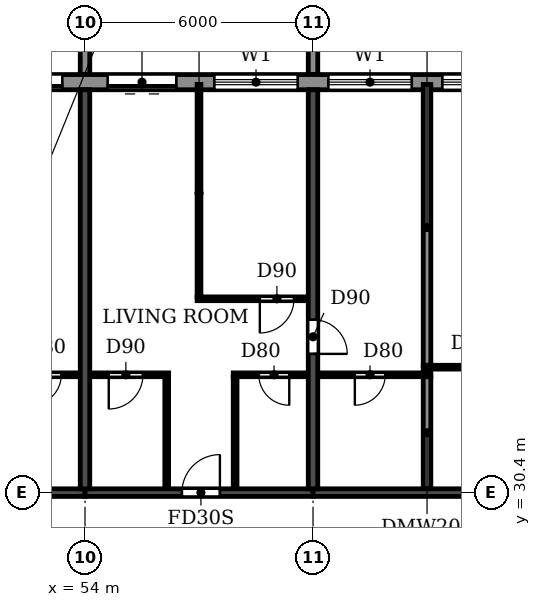
"""IFC4 building model, lengths in metres.
Left out: names, types, materials, properties, quantities, classifications, styles, units other than length and angle.
Written with IfcOpenShell. Run it as: python <this file> out.ifc"""

import sys

from ifc_helpers import new_model, si_unit, direction, frame, frame_2d, origin, place, context, subcontext, project, spatial, polyline, rectangle, outline, extrude, source, transform, mapped, element, fill, save


model = new_model("IFC4")
c1 = context("Model", 3, precision=1e-05, world=origin(), true_north=direction((0.0, 1.0)))
c2 = subcontext(c1, "Body", "Model", "MODEL_VIEW")
j1 = project(units=[si_unit("LENGTHUNIT", "METRE"), si_unit("PLANEANGLEUNIT", "RADIAN")], contexts=[c1])
p1 = place(None, origin())
s1 = spatial("IfcSite", under=j1, at=p1, CompositionType="ELEMENT")
p2 = place(p1, origin())
s2 = spatial("IfcBuilding", under=s1, at=p2, CompositionType="ELEMENT")
p3 = place(p2, frame((0.0, 0.0, 251.1)))
s3 = spatial("IfcBuildingStorey", under=s2, at=p3, CompositionType="ELEMENT", Elevation=251.1)
p4 = place(p3, frame((54.0, 30.5, 0.0), z_axis=(0.0, 0.0, 1.0), x_axis=(0.0, 1.0, 0.0)))
e1 = element("IfcWall", 1, at=p4, inside=s3, PredefinedType="SHEAR", context=c2, shape_type="SweptSolid", body=[
    extrude(rectangle(XDim=10.5, YDim=0.25, at=frame_2d((5.25, 0.0))), origin(), (0.0, 0.0, 1.0), 3.08),
])
p5 = place(p3, frame((60.0, 30.5, 0.0), z_axis=(0.0, 0.0, 1.0), x_axis=(0.0, 1.0, 0.0)))
e2 = element("IfcWall", 2, at=p5, inside=s3, PredefinedType="SHEAR", context=c2, shape_type="SweptSolid", body=[
    extrude(rectangle(XDim=10.5, YDim=0.25, at=frame_2d((5.25, 0.0))), origin(), (0.0, 0.0, 1.0), 3.08),
])
p6 = place(p5, frame((3.55, 0.0, 0.0)))
e3 = element("IfcOpeningElement", 3, at=p6, cuts=e2, PredefinedType="OPENING", context=c2, shape_type="SweptSolid", body=[
    extrude(rectangle(XDim=0.9, YDim=2.1, at=frame_2d((0.45, 1.05))), frame((0.0, 0.135, 0.0), z_axis=(0.0, -1.0, 0.0), x_axis=(1.0, 0.0, 0.0)), (0.0, 0.0, 1.0), 0.27),
])
p7 = place(p3, frame((48.0, 30.4, 0.0), z_axis=(0.0, 0.0, 1.0), x_axis=(1.0, 0.0, 0.0)))
e4 = element("IfcWall", 4, at=p7, inside=s3, PredefinedType="SHEAR", context=c2, shape_type="SweptSolid", body=[
    extrude(rectangle(XDim=6.0, YDim=0.2, at=frame_2d((3.0, 0.0))), origin(), (0.0, 0.0, 1.0), 2.48),
])
p8 = place(p7, frame((2.55, 0.0, 0.0)))
e5 = element("IfcOpeningElement", 5, at=p8, cuts=e4, PredefinedType="OPENING", context=c2, shape_type="SweptSolid", body=[
    extrude(rectangle(XDim=1.0, YDim=2.1, at=frame_2d((0.5, 1.05))), frame((0.0, 0.11, 0.0), z_axis=(0.0, -1.0, 0.0), x_axis=(1.0, 0.0, 0.0)), (0.0, 0.0, 1.0), 0.22),
])
p9 = place(p3, frame((54.0, 30.4, 0.0), z_axis=(0.0, 0.0, 1.0), x_axis=(1.0, 0.0, 0.0)))
e6 = element("IfcWall", 6, at=p9, inside=s3, PredefinedType="SHEAR", context=c2, shape_type="SweptSolid", body=[
    extrude(rectangle(XDim=6.0, YDim=0.2, at=frame_2d((3.0, 0.0))), origin(), (0.0, 0.0, 1.0), 2.48),
])
p10 = place(p9, frame((2.55, 0.0, 0.0)))
e7 = element("IfcOpeningElement", 7, at=p10, cuts=e6, PredefinedType="OPENING", context=c2, shape_type="SweptSolid", body=[
    extrude(rectangle(XDim=1.0, YDim=2.1, at=frame_2d((0.5, 1.05))), frame((0.0, 0.11, 0.0), z_axis=(0.0, -1.0, 0.0), x_axis=(1.0, 0.0, 0.0)), (0.0, 0.0, 1.0), 0.22),
])
p11 = place(p3, frame((60.0, 30.4, 0.0), z_axis=(0.0, 0.0, 1.0), x_axis=(1.0, 0.0, 0.0)))
e8 = element("IfcWall", 8, at=p11, inside=s3, PredefinedType="SHEAR", context=c2, shape_type="SweptSolid", body=[
    extrude(rectangle(XDim=6.0, YDim=0.2, at=frame_2d((3.0, 0.0))), origin(), (0.0, 0.0, 1.0), 2.48),
])
p12 = place(p3, frame((79.317, 41.2, 0.0), z_axis=(0.0, 0.0, 1.0), x_axis=(-1.0, 0.0, 0.0)))
e9 = element("IfcWall", 9, at=p12, inside=s3, PredefinedType="STANDARD", context=c2, shape_type="SweptSolid", body=[
    extrude(rectangle(XDim=56.634, YDim=0.4, at=frame_2d((28.317, 0.0))), origin(), (0.0, 0.0, 1.0), 3.08),
])
p13 = place(p12, frame((52.717, 0.0, 0.9)))
e10 = element("IfcOpeningElement", 10, at=p13, cuts=e9, PredefinedType="OPENING", context=c2, shape_type="SweptSolid", body=[
    extrude(rectangle(XDim=2.2, YDim=1.5, at=frame_2d((1.1, 0.75))), frame((0.0, 0.21, 0.0), z_axis=(0.0, -1.0, 0.0), x_axis=(1.0, 0.0, 0.0)), (0.0, 0.0, 1.0), 0.42),
])
p14 = place(p12, frame((49.717, 0.0, 0.9)))
e11 = element("IfcOpeningElement", 11, at=p14, cuts=e9, PredefinedType="OPENING", context=c2, shape_type="SweptSolid", body=[
    extrude(rectangle(XDim=2.2, YDim=1.5, at=frame_2d((1.1, 0.75))), frame((0.0, 0.21, 0.0), z_axis=(0.0, -1.0, 0.0), x_axis=(1.0, 0.0, 0.0)), (0.0, 0.0, 1.0), 0.42),
])
p15 = place(p12, frame((46.717, 0.0, 0.9)))
e12 = element("IfcOpeningElement", 12, at=p15, cuts=e9, PredefinedType="OPENING", context=c2, shape_type="SweptSolid", body=[
    extrude(rectangle(XDim=2.2, YDim=1.5, at=frame_2d((1.1, 0.75))), frame((0.0, 0.21, 0.0), z_axis=(0.0, -1.0, 0.0), x_axis=(1.0, 0.0, 0.0)), (0.0, 0.0, 1.0), 0.42),
])
p16 = place(p12, frame((43.917, 0.0, 0.0)))
e13 = element("IfcOpeningElement", 13, at=p16, cuts=e9, PredefinedType="OPENING", context=c2, shape_type="SweptSolid", body=[
    extrude(rectangle(XDim=1.8, YDim=2.4, at=frame_2d((0.9, 1.2))), frame((0.0, 0.21, 0.0), z_axis=(0.0, -1.0, 0.0), x_axis=(1.0, 0.0, 0.0)), (0.0, 0.0, 1.0), 0.42),
])
p17 = place(p12, frame((40.717, 0.0, 0.9)))
e14 = element("IfcOpeningElement", 14, at=p17, cuts=e9, PredefinedType="OPENING", context=c2, shape_type="SweptSolid", body=[
    extrude(rectangle(XDim=2.2, YDim=1.5, at=frame_2d((1.1, 0.75))), frame((0.0, 0.21, 0.0), z_axis=(0.0, -1.0, 0.0), x_axis=(1.0, 0.0, 0.0)), (0.0, 0.0, 1.0), 0.42),
])
p18 = place(p12, frame((37.917, 0.0, 0.0)))
e15 = element("IfcOpeningElement", 15, at=p18, cuts=e9, PredefinedType="OPENING", context=c2, shape_type="SweptSolid", body=[
    extrude(rectangle(XDim=1.8, YDim=2.4, at=frame_2d((0.9, 1.2))), frame((0.0, 0.21, 0.0), z_axis=(0.0, -1.0, 0.0), x_axis=(1.0, 0.0, 0.0)), (0.0, 0.0, 1.0), 0.42),
])
p19 = place(p12, frame((34.717, 0.0, 0.9)))
e16 = element("IfcOpeningElement", 16, at=p19, cuts=e9, PredefinedType="OPENING", context=c2, shape_type="SweptSolid", body=[
    extrude(rectangle(XDim=2.2, YDim=1.5, at=frame_2d((1.1, 0.75))), frame((0.0, 0.21, 0.0), z_axis=(0.0, -1.0, 0.0), x_axis=(1.0, 0.0, 0.0)), (0.0, 0.0, 1.0), 0.42),
])
p20 = place(p12, frame((31.717, 0.0, 0.9)))
e17 = element("IfcOpeningElement", 17, at=p20, cuts=e9, PredefinedType="OPENING", context=c2, shape_type="SweptSolid", body=[
    extrude(rectangle(XDim=2.2, YDim=1.5, at=frame_2d((1.1, 0.75))), frame((0.0, 0.21, 0.0), z_axis=(0.0, -1.0, 0.0), x_axis=(1.0, 0.0, 0.0)), (0.0, 0.0, 1.0), 0.42),
])
p21 = place(p12, frame((28.717, 0.0, 0.9)))
e18 = element("IfcOpeningElement", 18, at=p21, cuts=e9, PredefinedType="OPENING", context=c2, shape_type="SweptSolid", body=[
    extrude(rectangle(XDim=2.2, YDim=1.5, at=frame_2d((1.1, 0.75))), frame((0.0, 0.21, 0.0), z_axis=(0.0, -1.0, 0.0), x_axis=(1.0, 0.0, 0.0)), (0.0, 0.0, 1.0), 0.42),
])
p22 = place(p12, frame((25.917, 0.0, 0.0)))
e19 = element("IfcOpeningElement", 19, at=p22, cuts=e9, PredefinedType="OPENING", context=c2, shape_type="SweptSolid", body=[
    extrude(rectangle(XDim=1.8, YDim=2.4, at=frame_2d((0.9, 1.2))), frame((0.0, 0.21, 0.0), z_axis=(0.0, -1.0, 0.0), x_axis=(1.0, 0.0, 0.0)), (0.0, 0.0, 1.0), 0.42),
])
p23 = place(p12, frame((22.917, 0.0, 0.0)))
e20 = element("IfcOpeningElement", 20, at=p23, cuts=e9, PredefinedType="OPENING", context=c2, shape_type="SweptSolid", body=[
    extrude(rectangle(XDim=1.8, YDim=2.4, at=frame_2d((0.9, 1.2))), frame((0.0, 0.21, 0.0), z_axis=(0.0, -1.0, 0.0), x_axis=(1.0, 0.0, 0.0)), (0.0, 0.0, 1.0), 0.42),
])
p24 = place(p12, frame((19.717, 0.0, 0.9)))
e21 = element("IfcOpeningElement", 21, at=p24, cuts=e9, PredefinedType="OPENING", context=c2, shape_type="SweptSolid", body=[
    extrude(rectangle(XDim=2.2, YDim=1.5, at=frame_2d((1.1, 0.75))), frame((0.0, 0.21, 0.0), z_axis=(0.0, -1.0, 0.0), x_axis=(1.0, 0.0, 0.0)), (0.0, 0.0, 1.0), 0.42),
])
p25 = place(p12, frame((16.717, 0.0, 0.9)))
e22 = element("IfcOpeningElement", 22, at=p25, cuts=e9, PredefinedType="OPENING", context=c2, shape_type="SweptSolid", body=[
    extrude(rectangle(XDim=2.2, YDim=1.5, at=frame_2d((1.1, 0.75))), frame((0.0, 0.21, 0.0), z_axis=(0.0, -1.0, 0.0), x_axis=(1.0, 0.0, 0.0)), (0.0, 0.0, 1.0), 0.42),
])
p26 = place(p12, frame((13.717, 0.0, 0.9)))
e23 = element("IfcOpeningElement", 23, at=p26, cuts=e9, PredefinedType="OPENING", context=c2, shape_type="SweptSolid", body=[
    extrude(rectangle(XDim=2.2, YDim=1.5, at=frame_2d((1.1, 0.75))), frame((0.0, 0.21, 0.0), z_axis=(0.0, -1.0, 0.0), x_axis=(1.0, 0.0, 0.0)), (0.0, 0.0, 1.0), 0.42),
])
p27 = place(p12, frame((10.717, 0.0, 0.9)))
e24 = element("IfcOpeningElement", 24, at=p27, cuts=e9, PredefinedType="OPENING", context=c2, shape_type="SweptSolid", body=[
    extrude(rectangle(XDim=2.2, YDim=1.5, at=frame_2d((1.1, 0.75))), frame((0.0, 0.21, 0.0), z_axis=(0.0, -1.0, 0.0), x_axis=(1.0, 0.0, 0.0)), (0.0, 0.0, 1.0), 0.42),
])
p28 = place(p12, frame((7.917, 0.0, 0.0)))
e25 = element("IfcOpeningElement", 25, at=p28, cuts=e9, PredefinedType="OPENING", context=c2, shape_type="SweptSolid", body=[
    extrude(rectangle(XDim=1.8, YDim=2.4, at=frame_2d((0.9, 1.2))), frame((0.0, 0.21, 0.0), z_axis=(0.0, -1.0, 0.0), x_axis=(1.0, 0.0, 0.0)), (0.0, 0.0, 1.0), 0.42),
])
p29 = place(p12, frame((4.717, 0.0, 0.9)))
e26 = element("IfcOpeningElement", 26, at=p29, cuts=e9, PredefinedType="OPENING", context=c2, shape_type="SweptSolid", body=[
    extrude(rectangle(XDim=2.2, YDim=1.5, at=frame_2d((1.1, 0.75))), frame((0.0, 0.21, 0.0), z_axis=(0.0, -1.0, 0.0), x_axis=(1.0, 0.0, 0.0)), (0.0, 0.0, 1.0), 0.42),
])
p30 = place(p12, frame((1.917, 0.0, 0.0)))
e27 = element("IfcOpeningElement", 27, at=p30, cuts=e9, PredefinedType="OPENING", context=c2, shape_type="SweptSolid", body=[
    extrude(rectangle(XDim=1.8, YDim=2.4, at=frame_2d((0.9, 1.2))), frame((0.0, 0.21, 0.0), z_axis=(0.0, -1.0, 0.0), x_axis=(1.0, 0.0, 0.0)), (0.0, 0.0, 1.0), 0.42),
])
m1 = source(origin(), c2, "Body", "SweptSolid", [
    extrude(outline(polyline([(0.0, 0.0), (0.25, 0.0), (0.25, 3.1), (0.0, 3.1), (0.0, 0.0)])), origin(), (0.0, 0.0, 1.0), 3.1),
])
for number, where in (
    (28, (53.875, 41.4, 0.0)),
    (29, (59.875, 41.4, 0.0)),
):
    element("IfcWall", number, at=place(p3, frame(where)), inside=s3, PredefinedType="STANDARD", context=c2, shape_type="MappedRepresentation", body=[
        mapped(m1, transform((0.0, 0.0, 0.0))),
    ])
p31 = place(p3, frame((63.0, 30.51, 0.0), z_axis=(0.0, 0.0, 1.0), x_axis=(0.0, 1.0, 0.0)))
e30 = element("IfcWall", 30, at=p31, inside=s3, PredefinedType="PARTITIONING", context=c2, shape_type="SweptSolid", body=[
    extrude(rectangle(XDim=2.94, YDim=0.2, at=frame_2d((1.47, 0.0))), origin(), (0.0, 0.0, 1.0), 3.08),
])
p32 = place(p3, frame((63.0, 33.75, 0.0), z_axis=(0.0, 0.0, 1.0), x_axis=(0.0, 1.0, 0.0)))
e31 = element("IfcWall", 31, at=p32, inside=s3, PredefinedType="PARTITIONING", context=c2, shape_type="SweptSolid", body=[
    extrude(rectangle(XDim=7.39, YDim=0.2, at=frame_2d((3.695, 0.0))), origin(), (0.0, 0.0, 1.0), 3.08),
])
p33 = place(p3, frame((51.9, 33.5, 0.0), z_axis=(0.0, 0.0, 1.0), x_axis=(1.0, 0.0, 0.0)))
e32 = element("IfcWall", 32, at=p33, inside=s3, PredefinedType="PARTITIONING", context=c2, shape_type="SweptSolid", body=[
    extrude(rectangle(XDim=1.965, YDim=0.1, at=frame_2d((0.982, 0.0))), origin(), (0.0, 0.0, 1.0), 3.08),
])
p34 = place(p33, frame((0.675, 0.0, 0.0)))
e33 = element("IfcOpeningElement", 33, at=p34, cuts=e32, PredefinedType="OPENING", context=c2, shape_type="SweptSolid", body=[
    extrude(rectangle(XDim=0.8, YDim=2.1, at=frame_2d((0.4, 1.05))), frame((0.0, 0.06, 0.0), z_axis=(0.0, -1.0, 0.0), x_axis=(1.0, 0.0, 0.0)), (0.0, 0.0, 1.0), 0.12),
])
p35 = place(p3, frame((54.135, 33.5, 0.0), z_axis=(0.0, 0.0, 1.0), x_axis=(1.0, 0.0, 0.0)))
e34 = element("IfcWall", 34, at=p35, inside=s3, PredefinedType="PARTITIONING", context=c2, shape_type="SweptSolid", body=[
    extrude(rectangle(XDim=2.065, YDim=0.1, at=frame_2d((1.032, 0.0))), origin(), (0.0, 0.0, 1.0), 3.08),
])
p36 = place(p35, frame((0.49, 0.0, 0.0)))
e35 = element("IfcOpeningElement", 35, at=p36, cuts=e34, PredefinedType="OPENING", context=c2, shape_type="SweptSolid", body=[
    extrude(rectangle(XDim=0.9, YDim=2.1, at=frame_2d((0.45, 1.05))), frame((0.0, 0.06, 0.0), z_axis=(0.0, -1.0, 0.0), x_axis=(1.0, 0.0, 0.0)), (0.0, 0.0, 1.0), 0.12),
])
p37 = place(p3, frame((57.9, 33.5, 0.0), z_axis=(0.0, 0.0, 1.0), x_axis=(1.0, 0.0, 0.0)))
e36 = element("IfcWall", 36, at=p37, inside=s3, PredefinedType="PARTITIONING", context=c2, shape_type="SweptSolid", body=[
    extrude(rectangle(XDim=1.965, YDim=0.1, at=frame_2d((0.982, 0.0))), origin(), (0.0, 0.0, 1.0), 3.08),
])
p38 = place(p37, frame((0.675, 0.0, 0.0)))
e37 = element("IfcOpeningElement", 37, at=p38, cuts=e36, PredefinedType="OPENING", context=c2, shape_type="SweptSolid", body=[
    extrude(rectangle(XDim=0.8, YDim=2.1, at=frame_2d((0.4, 1.05))), frame((0.0, 0.06, 0.0), z_axis=(0.0, -1.0, 0.0), x_axis=(1.0, 0.0, 0.0)), (0.0, 0.0, 1.0), 0.12),
])
p39 = place(p3, frame((60.135, 33.5, 0.0), z_axis=(0.0, 0.0, 1.0), x_axis=(1.0, 0.0, 0.0)))
e38 = element("IfcWall", 38, at=p39, inside=s3, PredefinedType="PARTITIONING", context=c2, shape_type="SweptSolid", body=[
    extrude(rectangle(XDim=2.965, YDim=0.1, at=frame_2d((1.482, 0.0))), origin(), (0.0, 0.0, 1.0), 3.08),
])
p40 = place(p39, frame((0.965, 0.0, 0.0)))
e39 = element("IfcOpeningElement", 39, at=p40, cuts=e38, PredefinedType="OPENING", context=c2, shape_type="SweptSolid", body=[
    extrude(rectangle(XDim=0.8, YDim=2.1, at=frame_2d((0.4, 1.05))), frame((0.0, 0.06, 0.0), z_axis=(0.0, -1.0, 0.0), x_axis=(1.0, 0.0, 0.0)), (0.0, 0.0, 1.0), 0.12),
])
p41 = place(p3, frame((62.9, 33.7, 0.0), z_axis=(0.0, 0.0, 1.0), x_axis=(1.0, 0.0, 0.0)))
e40 = element("IfcWall", 40, at=p41, inside=s3, PredefinedType="PARTITIONING", context=c2, shape_type="SweptSolid", body=[
    extrude(rectangle(XDim=2.965, YDim=0.1, at=frame_2d((1.482, 0.0))), origin(), (0.0, 0.0, 1.0), 3.08),
])
p42 = place(p41, frame((1.2, 0.0, 0.0)))
e41 = element("IfcOpeningElement", 41, at=p42, cuts=e40, PredefinedType="OPENING", context=c2, shape_type="SweptSolid", body=[
    extrude(rectangle(XDim=0.8, YDim=2.1, at=frame_2d((0.4, 1.05))), frame((0.0, 0.06, 0.0), z_axis=(0.0, -1.0, 0.0), x_axis=(1.0, 0.0, 0.0)), (0.0, 0.0, 1.0), 0.12),
])
p43 = place(p3, frame((56.95, 35.5, 0.0), z_axis=(0.0, 0.0, 1.0), x_axis=(1.0, 0.0, 0.0)))
e42 = element("IfcWall", 42, at=p43, inside=s3, PredefinedType="PARTITIONING", context=c2, shape_type="SweptSolid", body=[
    extrude(rectangle(XDim=2.915, YDim=0.1, at=frame_2d((1.458, 0.0))), origin(), (0.0, 0.0, 1.0), 3.08),
])
p44 = place(p43, frame((1.65, 0.0, 0.0)))
e43 = element("IfcOpeningElement", 43, at=p44, cuts=e42, PredefinedType="OPENING", context=c2, shape_type="SweptSolid", body=[
    extrude(rectangle(XDim=0.9, YDim=2.1, at=frame_2d((0.45, 1.05))), frame((0.0, 0.06, 0.0), z_axis=(0.0, -1.0, 0.0), x_axis=(1.0, 0.0, 0.0)), (0.0, 0.0, 1.0), 0.12),
])
p45 = place(p3, frame((56.15, 30.51, 0.0), z_axis=(0.0, 0.0, 1.0), x_axis=(0.0, 1.0, 0.0)))
e44 = element("IfcWall", 44, at=p45, inside=s3, PredefinedType="PARTITIONING", context=c2, shape_type="SweptSolid", body=[
    extrude(rectangle(XDim=2.94, YDim=0.1, at=frame_2d((1.47, 0.0))), origin(), (0.0, 0.0, 1.0), 3.08),
])
p46 = place(p3, frame((57.0, 35.55, 0.0), z_axis=(0.0, 0.0, 1.0), x_axis=(0.0, 1.0, 0.0)))
e45 = element("IfcWall", 45, at=p46, inside=s3, PredefinedType="PARTITIONING", context=c2, shape_type="SweptSolid", body=[
    extrude(rectangle(XDim=5.59, YDim=0.1, at=frame_2d((2.795, 0.0))), origin(), (0.0, 0.0, 1.0), 3.08),
])
p47 = place(p3, frame((57.95, 30.51, 0.0), z_axis=(0.0, 0.0, 1.0), x_axis=(0.0, 1.0, 0.0)))
e46 = element("IfcWall", 46, at=p47, inside=s3, PredefinedType="PARTITIONING", context=c2, shape_type="SweptSolid", body=[
    extrude(rectangle(XDim=2.94, YDim=0.1, at=frame_2d((1.47, 0.0))), origin(), (0.0, 0.0, 1.0), 3.08),
])
p48 = place(p22, origin())
e47 = element("IfcDoor", 47, at=p48, inside=s3, OperationType="DOUBLE_DOOR_SLIDING", PredefinedType="DOOR", context=c2, shape_type="SweptSolid", body=[
    extrude(rectangle(XDim=1.8, YDim=2.4, at=frame_2d((0.9, 1.2))), frame((0.0, 0.025, 0.0), z_axis=(0.0, -1.0, 0.0), x_axis=(1.0, 0.0, 0.0)), (0.0, 0.0, 1.0), 0.05),
])
fill(e19, e47)
p49 = place(p23, origin())
e48 = element("IfcDoor", 48, at=p49, inside=s3, OperationType="DOUBLE_DOOR_SLIDING", PredefinedType="DOOR", context=c2, shape_type="SweptSolid", body=[
    extrude(rectangle(XDim=1.8, YDim=2.4, at=frame_2d((0.9, 1.2))), frame((0.0, 0.025, 0.0), z_axis=(0.0, -1.0, 0.0), x_axis=(1.0, 0.0, 0.0)), (0.0, 0.0, 1.0), 0.05),
])
fill(e20, e48)
p50 = place(p24, origin())
e49 = element("IfcWindow", 49, at=p50, inside=s3, PartitioningType="DOUBLE_PANEL_HORIZONTAL", PredefinedType="WINDOW", context=c2, shape_type="SweptSolid", body=[
    extrude(rectangle(XDim=2.2, YDim=1.5, at=frame_2d((1.1, 0.75))), frame((0.0, 0.03, 0.0), z_axis=(0.0, -1.0, 0.0), x_axis=(1.0, 0.0, 0.0)), (0.0, 0.0, 1.0), 0.06),
])
fill(e21, e49)
p51 = place(p25, origin())
e50 = element("IfcWindow", 50, at=p51, inside=s3, PartitioningType="DOUBLE_PANEL_HORIZONTAL", PredefinedType="WINDOW", context=c2, shape_type="SweptSolid", body=[
    extrude(rectangle(XDim=2.2, YDim=1.5, at=frame_2d((1.1, 0.75))), frame((0.0, 0.03, 0.0), z_axis=(0.0, -1.0, 0.0), x_axis=(1.0, 0.0, 0.0)), (0.0, 0.0, 1.0), 0.06),
])
fill(e22, e50)
p52 = place(p26, origin())
e51 = element("IfcWindow", 51, at=p52, inside=s3, PartitioningType="DOUBLE_PANEL_HORIZONTAL", PredefinedType="WINDOW", context=c2, shape_type="SweptSolid", body=[
    extrude(rectangle(XDim=2.2, YDim=1.5, at=frame_2d((1.1, 0.75))), frame((0.0, 0.03, 0.0), z_axis=(0.0, -1.0, 0.0), x_axis=(1.0, 0.0, 0.0)), (0.0, 0.0, 1.0), 0.06),
])
fill(e23, e51)
p53 = place(p34, frame((0.8, 0.0, 0.0), z_axis=(0.0, 0.0, 1.0), x_axis=(-1.0, 0.0, 0.0)))
e52 = element("IfcDoor", 52, at=p53, inside=s3, OperationType="SINGLE_SWING_RIGHT", PredefinedType="DOOR", context=c2, shape_type="SweptSolid", body=[
    extrude(rectangle(XDim=0.8, YDim=2.1, at=frame_2d((0.4, 1.05))), frame((0.0, 0.025, 0.0), z_axis=(0.0, -1.0, 0.0), x_axis=(1.0, 0.0, 0.0)), (0.0, 0.0, 1.0), 0.05),
])
fill(e33, e52)
p54 = place(p40, frame((0.8, 0.0, 0.0), z_axis=(0.0, 0.0, 1.0), x_axis=(-1.0, 0.0, 0.0)))
e53 = element("IfcDoor", 53, at=p54, inside=s3, OperationType="SINGLE_SWING_RIGHT", PredefinedType="DOOR", context=c2, shape_type="SweptSolid", body=[
    extrude(rectangle(XDim=0.8, YDim=2.1, at=frame_2d((0.4, 1.05))), frame((0.0, 0.025, 0.0), z_axis=(0.0, -1.0, 0.0), x_axis=(1.0, 0.0, 0.0)), (0.0, 0.0, 1.0), 0.05),
])
fill(e39, e53)
p55 = place(p36, frame((0.9, 0.0, 0.0), z_axis=(0.0, 0.0, 1.0), x_axis=(-1.0, 0.0, 0.0)))
e54 = element("IfcDoor", 54, at=p55, inside=s3, OperationType="SINGLE_SWING_RIGHT", PredefinedType="DOOR", context=c2, shape_type="SweptSolid", body=[
    extrude(rectangle(XDim=0.9, YDim=2.1, at=frame_2d((0.45, 1.05))), frame((0.0, 0.025, 0.0), z_axis=(0.0, -1.0, 0.0), x_axis=(1.0, 0.0, 0.0)), (0.0, 0.0, 1.0), 0.05),
])
fill(e35, e54)
p56 = place(p10, origin())
e55 = element("IfcDoor", 55, at=p56, inside=s3, OperationType="SINGLE_SWING_RIGHT", PredefinedType="DOOR", context=c2, shape_type="SweptSolid", body=[
    extrude(rectangle(XDim=1.0, YDim=2.1, at=frame_2d((0.5, 1.05))), frame((0.0, 0.025, 0.0), z_axis=(0.0, -1.0, 0.0), x_axis=(1.0, 0.0, 0.0)), (0.0, 0.0, 1.0), 0.05),
])
fill(e7, e55)
p57 = place(p38, frame((0.8, 0.0, 0.0), z_axis=(0.0, 0.0, 1.0), x_axis=(-1.0, 0.0, 0.0)))
e56 = element("IfcDoor", 56, at=p57, inside=s3, OperationType="SINGLE_SWING_LEFT", PredefinedType="DOOR", context=c2, shape_type="SweptSolid", body=[
    extrude(rectangle(XDim=0.8, YDim=2.1, at=frame_2d((0.4, 1.05))), frame((0.0, 0.025, 0.0), z_axis=(0.0, -1.0, 0.0), x_axis=(1.0, 0.0, 0.0)), (0.0, 0.0, 1.0), 0.05),
])
fill(e37, e56)
p58 = place(p44, frame((0.9, 0.0, 0.0), z_axis=(0.0, 0.0, 1.0), x_axis=(-1.0, 0.0, 0.0)))
e57 = element("IfcDoor", 57, at=p58, inside=s3, OperationType="SINGLE_SWING_RIGHT", PredefinedType="DOOR", context=c2, shape_type="SweptSolid", body=[
    extrude(rectangle(XDim=0.9, YDim=2.1, at=frame_2d((0.45, 1.05))), frame((0.0, 0.025, 0.0), z_axis=(0.0, -1.0, 0.0), x_axis=(1.0, 0.0, 0.0)), (0.0, 0.0, 1.0), 0.05),
])
fill(e43, e57)
p59 = place(p6, frame((0.9, 0.0, 0.0), z_axis=(0.0, 0.0, 1.0), x_axis=(-1.0, 0.0, 0.0)))
e58 = element("IfcDoor", 58, at=p59, inside=s3, OperationType="SINGLE_SWING_RIGHT", PredefinedType="DOOR", context=c2, shape_type="SweptSolid", body=[
    extrude(rectangle(XDim=0.9, YDim=2.1, at=frame_2d((0.45, 1.05))), frame((0.0, 0.025, 0.0), z_axis=(0.0, -1.0, 0.0), x_axis=(1.0, 0.0, 0.0)), (0.0, 0.0, 1.0), 0.05),
])
fill(e3, e58)
save(model, sys.argv[1])
